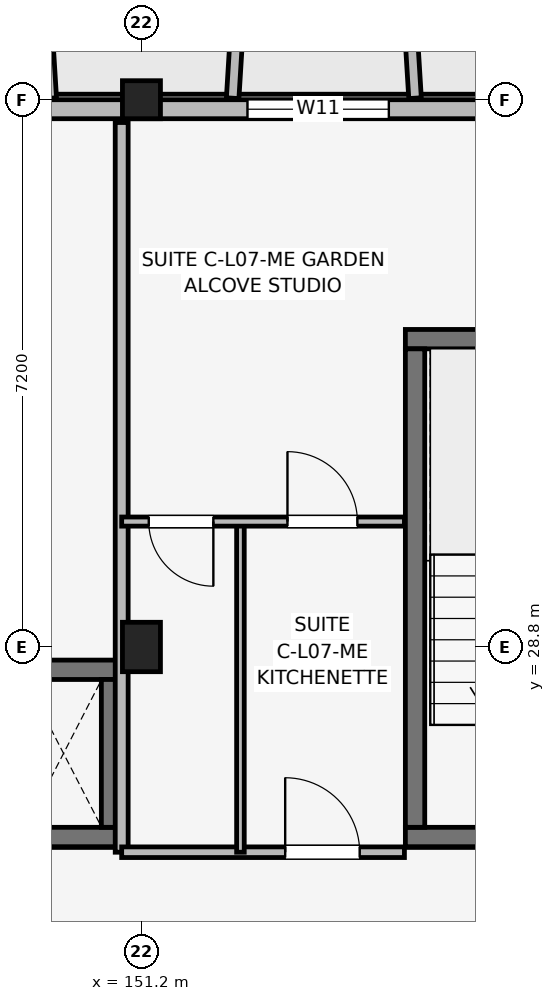
"""IFC4 building model, lengths in metres.
Left out: names, types, materials, properties, quantities, classifications, styles, units other than length and angle.
Written with IfcOpenShell. Run it as: python <this file> out.ifc"""

import sys

from ifc_helpers import new_model, si_unit, direction, frame, frame_2d, origin, origin_2d, place, context, subcontext, project, spatial, rectangle, extrude, element, fill, save


model = new_model("IFC4")
c1 = context("Model", 3, precision=1e-05, world=origin(), true_north=direction((0.0, 1.0)))
c2 = subcontext(c1, "Body", "Model", "MODEL_VIEW")
j1 = project(units=[si_unit("LENGTHUNIT", "METRE"), si_unit("PLANEANGLEUNIT", "RADIAN")], contexts=[c1])
p1 = place(None, origin())
s1 = spatial("IfcSite", under=j1, at=p1, CompositionType="ELEMENT")
p2 = place(p1, origin())
s2 = spatial("IfcBuilding", under=s1, at=p2, CompositionType="ELEMENT")
p3 = place(p2, frame((0.0, 0.0, 24.45)))
s3 = spatial("IfcBuildingStorey", under=s2, at=p3, CompositionType="ELEMENT", Elevation=24.45)
p4 = place(p3, frame((151.2, 28.8, 0.0), z_axis=(0.0, 0.0, 1.0), x_axis=(1.0, 0.0, 0.0)))
e1 = element("IfcColumn", 1, at=p4, inside=s3, PredefinedType="COLUMN", context=c2, shape_type="SweptSolid", body=[
    extrude(rectangle(XDim=0.5, YDim=0.65, at=origin_2d()), origin(), (0.0, 0.0, 1.0), 3.15),
])
p5 = place(p3, frame((151.2, 36.0, 0.0), z_axis=(0.0, 0.0, 1.0), x_axis=(1.0, 0.0, 0.0)))
e2 = element("IfcColumn", 2, at=p5, inside=s3, PredefinedType="COLUMN", context=c2, shape_type="SweptSolid", body=[
    extrude(rectangle(XDim=0.5, YDim=0.5, at=origin_2d()), origin(), (0.0, 0.0, 1.0), 3.15),
])
p6 = place(p3, frame((154.673, 26.3, 0.0), z_axis=(0.0, 0.0, 1.0), x_axis=(1.0, 0.0, 0.0)))
e3 = element("IfcWall", 3, at=p6, inside=s3, PredefinedType="SHEAR", context=c2, shape_type="SweptSolid", body=[
    extrude(rectangle(XDim=3.305, YDim=0.255, at=frame_2d((1.652, 0.0))), origin(), (0.0, 0.0, 1.0), 3.15),
])
p7 = place(p6, frame((1.127, 0.0, 0.0)))
e4 = element("IfcOpeningElement", 4, at=p7, cuts=e3, PredefinedType="OPENING", context=c2, shape_type="SweptSolid", body=[
    extrude(rectangle(XDim=1.05, YDim=2.12, at=frame_2d((0.525, 1.06))), frame((0.0, 0.137, 0.0), z_axis=(0.0, -1.0, 0.0), x_axis=(1.0, 0.0, 0.0)), (0.0, 0.0, 1.0), 0.275),
])
p8 = place(p3, frame((154.673, 32.85, 0.0), z_axis=(0.0, 0.0, 1.0), x_axis=(1.0, 0.0, 0.0)))
e5 = element("IfcWall", 5, at=p8, inside=s3, PredefinedType="SHEAR", context=c2, shape_type="SweptSolid", body=[
    extrude(rectangle(XDim=3.305, YDim=0.255, at=frame_2d((1.652, 0.0))), origin(), (0.0, 0.0, 1.0), 3.15),
])
p9 = place(p3, frame((154.8, 26.427, 0.0), z_axis=(0.0, 0.0, 1.0), x_axis=(0.0, 1.0, 0.0)))
e6 = element("IfcWall", 6, at=p9, inside=s3, PredefinedType="SHEAR", context=c2, shape_type="SweptSolid", body=[
    extrude(rectangle(XDim=6.295, YDim=0.255, at=frame_2d((3.147, 0.0))), origin(), (0.0, 0.0, 1.0), 3.15),
])
for number, where, z_axis, x_axis in (
    (7, (149.123, 26.3, 0.0), (0.0, 0.0, 1.0), (1.0, 0.0, 0.0)),
    (8, (149.123, 28.5, 0.0), (0.0, 0.0, 1.0), (1.0, 0.0, 0.0)),
):
    element("IfcWall", number, at=place(p3, frame(where, z_axis=z_axis, x_axis=x_axis)), inside=s3, PredefinedType="SHEAR", context=c2, shape_type="SweptSolid", body=[
        extrude(rectangle(XDim=1.805, YDim=0.255, at=frame_2d((0.902, 0.0))), origin(), (0.0, 0.0, 1.0), 3.15),
    ])
p10 = place(p3, frame((150.8, 26.427, 0.0), z_axis=(0.0, 0.0, 1.0), x_axis=(0.0, 1.0, 0.0)))
e9 = element("IfcWall", 9, at=p10, inside=s3, PredefinedType="SHEAR", context=c2, shape_type="SweptSolid", body=[
    extrude(rectangle(XDim=1.945, YDim=0.255, at=frame_2d((0.973, 0.0))), origin(), (0.0, 0.0, 1.0), 3.15),
])
p11 = place(p3, frame((162.6, 35.875, 0.0), z_axis=(0.0, 0.0, 1.0), x_axis=(-1.0, 0.0, 0.0)))
e10 = element("IfcWall", 10, at=p11, inside=s3, PredefinedType="SOLIDWALL", context=c2, shape_type="SweptSolid", body=[
    extrude(rectangle(XDim=30.0, YDim=0.25, at=frame_2d((15.0, 0.0))), origin(), (0.0, 0.0, 1.0), 2.43),
])
p12 = place(p11, frame((29.1, 0.0, 0.0), z_axis=(0.0, 0.0, 1.0), x_axis=(-1.0, 0.0, 0.0)))
e11 = element("IfcOpeningElement", 11, at=p12, cuts=e10, PredefinedType="OPENING", context=c2, shape_type="SweptSolid", body=[
    extrude(rectangle(XDim=1.8, YDim=2.15, at=frame_2d((0.9, 1.075))), frame((0.0, 0.135, 0.0), z_axis=(0.0, -1.0, 0.0), x_axis=(1.0, 0.0, 0.0)), (0.0, 0.0, 1.0), 0.27),
])
p13 = place(p11, frame((2.55, 0.0, 0.0), z_axis=(0.0, 0.0, 1.0), x_axis=(-1.0, 0.0, 0.0)))
e12 = element("IfcOpeningElement", 12, at=p13, cuts=e10, PredefinedType="OPENING", context=c2, shape_type="SweptSolid", body=[
    extrude(rectangle(XDim=1.5, YDim=2.15, at=frame_2d((0.75, 1.075))), frame((0.0, 0.135, 0.0), z_axis=(0.0, -1.0, 0.0), x_axis=(1.0, 0.0, 0.0)), (0.0, 0.0, 1.0), 0.27),
])
p14 = place(p11, frame((15.355, 0.0, 0.5)))
e13 = element("IfcOpeningElement", 13, at=p14, cuts=e10, PredefinedType="OPENING", context=c2, shape_type="SweptSolid", body=[
    extrude(rectangle(XDim=0.9, YDim=1.8, at=frame_2d((0.45, 0.9))), frame((0.0, 0.135, 0.0), z_axis=(0.0, -1.0, 0.0), x_axis=(1.0, 0.0, 0.0)), (0.0, 0.0, 1.0), 0.27),
])
p15 = place(p11, frame((8.145, 0.0, 0.7)))
e14 = element("IfcOpeningElement", 14, at=p15, cuts=e10, PredefinedType="OPENING", context=c2, shape_type="SweptSolid", body=[
    extrude(rectangle(XDim=1.86, YDim=1.6, at=frame_2d((0.93, 0.8))), frame((0.0, 0.135, 0.0), z_axis=(0.0, -1.0, 0.0), x_axis=(1.0, 0.0, 0.0)), (0.0, 0.0, 1.0), 0.27),
])
p16 = place(p11, frame((19.97, 0.0, 0.7)))
e15 = element("IfcOpeningElement", 15, at=p16, cuts=e10, PredefinedType="OPENING", context=c2, shape_type="SweptSolid", body=[
    extrude(rectangle(XDim=1.86, YDim=1.6, at=frame_2d((0.93, 0.8))), frame((0.0, 0.135, 0.0), z_axis=(0.0, -1.0, 0.0), x_axis=(1.0, 0.0, 0.0)), (0.0, 0.0, 1.0), 0.27),
])
p17 = place(p3, frame((150.0, 36.02, 0.0), z_axis=(0.0, 0.0, 1.0), x_axis=(-0.061170732449, 0.998127317276, 0.0)))
e16 = element("IfcWall", 16, at=p17, inside=s3, PredefinedType="ELEMENTEDWALL", context=c2, shape_type="SweptSolid", body=[
    extrude(rectangle(XDim=1.964, YDim=0.165, at=frame_2d((0.982, 0.0))), origin(), (0.0, 0.0, 1.0), 2.48),
])
for number, where, z_axis, x_axis in (
    (17, (152.4, 36.02, 0.0), (0.0, 0.0, 1.0), (0.061, 0.998, 0.0)),
    (18, (154.8, 36.02, 0.0), (0.0, 0.0, 1.0), (-0.061, 0.998, 0.0)),
):
    element("IfcWall", number, at=place(p3, frame(where, z_axis=z_axis, x_axis=x_axis)), inside=s3, PredefinedType="ELEMENTEDWALL", context=c2, shape_type="SweptSolid", body=[
        extrude(rectangle(XDim=1.964, YDim=0.165, at=frame_2d((0.982, 0.0))), origin(), (0.0, 0.0, 1.0), 2.53),
    ])
p18 = place(p3, frame((150.94, 26.1, 0.0), z_axis=(0.0, 0.0, 1.0), x_axis=(0.0, 1.0, 0.0)))
e19 = element("IfcWall", 19, at=p18, inside=s3, PredefinedType="PARTITIONING", context=c2, shape_type="SweptSolid", body=[
    extrude(rectangle(XDim=9.6, YDim=0.17, at=frame_2d((4.8, 0.0))), origin(), (0.0, 0.0, 1.0), 2.38),
])
p19 = place(p3, frame((150.94, 26.1, 0.0), z_axis=(0.0, 0.0, 1.0), x_axis=(1.0, 0.0, 0.0)))
e20 = element("IfcWall", 20, at=p19, inside=s3, PredefinedType="PARTITIONING", context=c2, shape_type="SweptSolid", body=[
    extrude(rectangle(XDim=3.72, YDim=0.14, at=frame_2d((1.86, 0.0))), origin(), (0.0, 0.0, 1.0), 2.38),
])
p20 = place(p19, frame((2.151, 0.0, 0.0)))
e21 = element("IfcOpeningElement", 21, at=p20, cuts=e20, PredefinedType="OPENING", context=c2, shape_type="SweptSolid", body=[
    extrude(rectangle(XDim=0.98, YDim=2.1, at=frame_2d((0.49, 1.05))), frame((0.0, 0.08, 0.0), z_axis=(0.0, -1.0, 0.0), x_axis=(1.0, 0.0, 0.0)), (0.0, 0.0, 1.0), 0.16),
])
p21 = place(p3, frame((152.502, 26.1, 0.0), z_axis=(0.0, 0.0, 1.0), x_axis=(0.0, 1.0, 0.0)))
e22 = element("IfcWall", 22, at=p21, inside=s3, PredefinedType="PARTITIONING", context=c2, shape_type="SweptSolid", body=[
    extrude(rectangle(XDim=4.35, YDim=0.1, at=frame_2d((2.175, 0.0))), origin(), (0.0, 0.0, 1.0), 2.38),
])
p22 = place(p3, frame((150.94, 30.45, 0.0), z_axis=(0.0, 0.0, 1.0), x_axis=(1.0, 0.0, 0.0)))
e23 = element("IfcWall", 23, at=p22, inside=s3, PredefinedType="PARTITIONING", context=c2, shape_type="SweptSolid", body=[
    extrude(rectangle(XDim=3.72, YDim=0.12, at=frame_2d((1.86, 0.0))), origin(), (0.0, 0.0, 1.0), 2.38),
])
p23 = place(p22, frame((1.206, 0.0, 0.0), z_axis=(0.0, 0.0, 1.0), x_axis=(-1.0, 0.0, 0.0)))
e24 = element("IfcOpeningElement", 24, at=p23, cuts=e23, PredefinedType="OPENING", context=c2, shape_type="SweptSolid", body=[
    extrude(rectangle(XDim=0.85, YDim=2.08, at=frame_2d((0.425, 1.04))), frame((0.0, 0.07, 0.0), z_axis=(0.0, -1.0, 0.0), x_axis=(1.0, 0.0, 0.0)), (0.0, 0.0, 1.0), 0.14),
])
p24 = place(p22, frame((2.181, 0.0, 0.0)))
e25 = element("IfcOpeningElement", 25, at=p24, cuts=e23, PredefinedType="OPENING", context=c2, shape_type="SweptSolid", body=[
    extrude(rectangle(XDim=0.92, YDim=2.08, at=frame_2d((0.46, 1.04))), frame((0.0, 0.07, 0.0), z_axis=(0.0, -1.0, 0.0), x_axis=(1.0, 0.0, 0.0)), (0.0, 0.0, 1.0), 0.14),
])
p25 = place(p15, origin())
e26 = element("IfcWindow", 26, at=p25, inside=s3, PartitioningType="SINGLE_PANEL", PredefinedType="WINDOW", context=c2, shape_type="SweptSolid", body=[
    extrude(rectangle(XDim=1.86, YDim=1.6, at=frame_2d((0.93, 0.8))), frame((0.0, 0.03, 0.0), z_axis=(0.0, -1.0, 0.0), x_axis=(1.0, 0.0, 0.0)), (0.0, 0.0, 1.0), 0.06),
])
fill(e14, e26)
p26 = place(p20, origin())
e27 = element("IfcDoor", 27, at=p26, inside=s3, OperationType="SINGLE_SWING_LEFT", PredefinedType="DOOR", context=c2, shape_type="SweptSolid", body=[
    extrude(rectangle(XDim=0.98, YDim=2.1, at=frame_2d((0.49, 1.05))), frame((0.0, 0.025, 0.0), z_axis=(0.0, -1.0, 0.0), x_axis=(1.0, 0.0, 0.0)), (0.0, 0.0, 1.0), 0.05),
])
fill(e21, e27)
p27 = place(p23, origin())
e28 = element("IfcDoor", 28, at=p27, inside=s3, OperationType="SINGLE_SWING_RIGHT", PredefinedType="DOOR", context=c2, shape_type="SweptSolid", body=[
    extrude(rectangle(XDim=0.85, YDim=2.08, at=frame_2d((0.425, 1.04))), frame((0.0, 0.025, 0.0), z_axis=(0.0, -1.0, 0.0), x_axis=(1.0, 0.0, 0.0)), (0.0, 0.0, 1.0), 0.05),
])
fill(e24, e28)
p28 = place(p24, origin())
e29 = element("IfcDoor", 29, at=p28, inside=s3, OperationType="SINGLE_SWING_LEFT", PredefinedType="DOOR", context=c2, shape_type="SweptSolid", body=[
    extrude(rectangle(XDim=0.92, YDim=2.08, at=frame_2d((0.46, 1.04))), frame((0.0, 0.025, 0.0), z_axis=(0.0, -1.0, 0.0), x_axis=(1.0, 0.0, 0.0)), (0.0, 0.0, 1.0), 0.05),
])
fill(e25, e29)
save(model, sys.argv[1])
